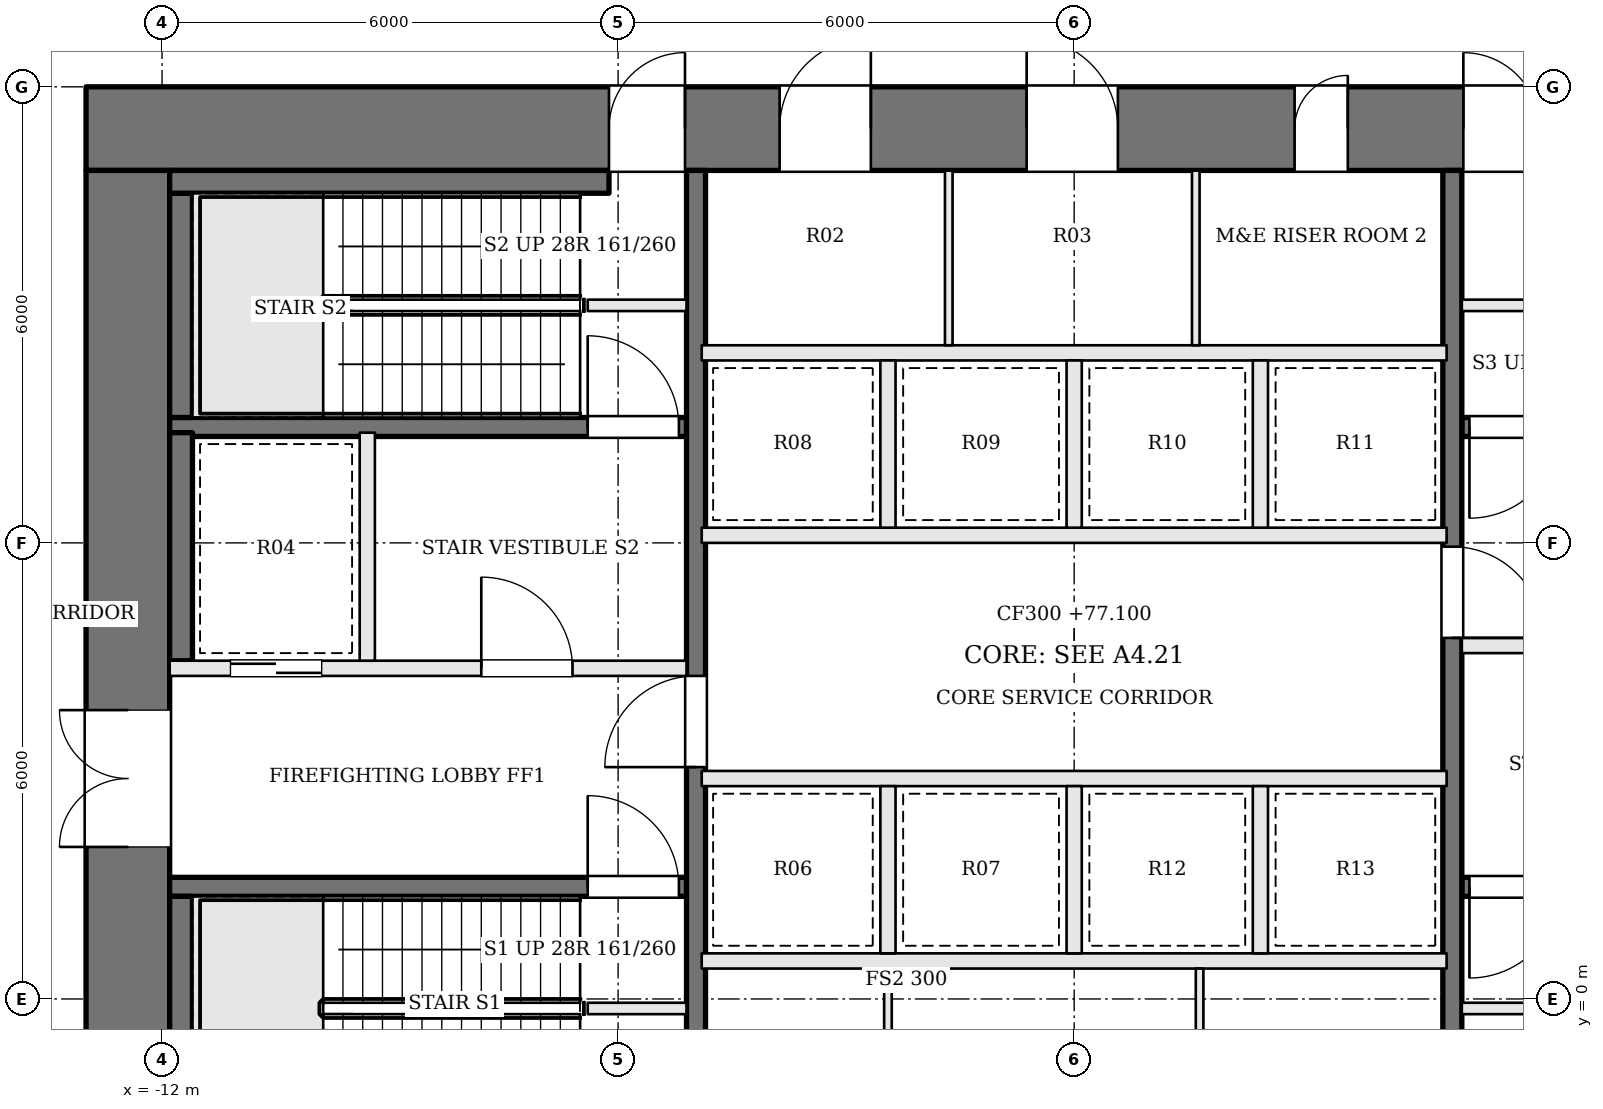
"""IFC4 building model, lengths in metres.
Left out: names, types, materials, properties, quantities, classifications, styles, units other than length and angle.
Written with IfcOpenShell. Run it as: python <this file> out.ifc"""

import sys

from ifc_helpers import new_model, si_unit, direction, frame, frame_2d, origin, place, context, subcontext, project, spatial, rectangle, extrude, element, fill, save


model = new_model("IFC4")
c1 = context("Model", 3, precision=1e-05, world=origin(), true_north=direction((0.0, 1.0)))
c2 = subcontext(c1, "Body", "Model", "MODEL_VIEW")
j1 = project(units=[si_unit("LENGTHUNIT", "METRE"), si_unit("PLANEANGLEUNIT", "RADIAN")], contexts=[c1])
p1 = place(None, origin())
s1 = spatial("IfcSite", under=j1, at=p1, CompositionType="ELEMENT")
p2 = place(p1, origin())
s2 = spatial("IfcBuilding", under=s1, at=p2, CompositionType="ELEMENT")
p3 = place(p2, frame((0.0, 0.0, 77.1)))
s3 = spatial("IfcBuildingStorey", under=s2, at=p3, CompositionType="ELEMENT", Elevation=77.1)
p4 = place(p3, frame((-13.0, 11.45, 0.0), z_axis=(0.0, 0.0, 1.0), x_axis=(1.0, 0.0, 0.0)))
e1 = element("IfcWall", 1, at=p4, inside=s3, PredefinedType="SHEAR", context=c2, shape_type="SweptSolid", body=[
    extrude(rectangle(XDim=26.0, YDim=1.1, at=frame_2d((13.0, 0.0))), origin(), (0.0, 0.0, 1.0), 4.5),
])
p5 = place(p4, frame((9.125, 0.0, 0.0)))
e2 = element("IfcOpeningElement", 2, at=p5, cuts=e1, PredefinedType="OPENING", context=c2, shape_type="SweptSolid", body=[
    extrude(rectangle(XDim=1.2, YDim=2.1, at=frame_2d((0.6, 1.05))), frame((0.0, 0.56, 0.0), z_axis=(0.0, -1.0, 0.0), x_axis=(1.0, 0.0, 0.0)), (0.0, 0.0, 1.0), 1.12),
])
p6 = place(p4, frame((12.375, 0.0, 0.0)))
e3 = element("IfcOpeningElement", 3, at=p6, cuts=e1, PredefinedType="OPENING", context=c2, shape_type="SweptSolid", body=[
    extrude(rectangle(XDim=1.2, YDim=2.1, at=frame_2d((0.6, 1.05))), frame((0.0, 0.56, 0.0), z_axis=(0.0, -1.0, 0.0), x_axis=(1.0, 0.0, 0.0)), (0.0, 0.0, 1.0), 1.12),
])
p7 = place(p4, frame((15.9, 0.0, 0.0)))
e4 = element("IfcOpeningElement", 4, at=p7, cuts=e1, PredefinedType="OPENING", context=c2, shape_type="SweptSolid", body=[
    extrude(rectangle(XDim=0.7, YDim=2.1, at=frame_2d((0.35, 1.05))), frame((0.0, 0.56, 0.0), z_axis=(0.0, -1.0, 0.0), x_axis=(1.0, 0.0, 0.0)), (0.0, 0.0, 1.0), 1.12),
])
p8 = place(p4, frame((6.88, 0.0, 0.0)))
e5 = element("IfcOpeningElement", 5, at=p8, cuts=e1, PredefinedType="OPENING", context=c2, shape_type="SweptSolid", body=[
    extrude(rectangle(XDim=1.0, YDim=2.1, at=frame_2d((0.5, 1.05))), frame((0.0, 0.56, 0.0), z_axis=(0.0, -1.0, 0.0), x_axis=(1.0, 0.0, 0.0)), (0.0, 0.0, 1.0), 1.12),
])
p9 = place(p4, frame((18.12, 0.0, 0.0)))
e6 = element("IfcOpeningElement", 6, at=p9, cuts=e1, PredefinedType="OPENING", context=c2, shape_type="SweptSolid", body=[
    extrude(rectangle(XDim=1.0, YDim=2.1, at=frame_2d((0.5, 1.05))), frame((0.0, 0.56, 0.0), z_axis=(0.0, -1.0, 0.0), x_axis=(1.0, 0.0, 0.0)), (0.0, 0.0, 1.0), 1.12),
])
p10 = place(p3, frame((-12.45, -1.9, 0.0), z_axis=(0.0, 0.0, 1.0), x_axis=(0.0, 1.0, 0.0)))
e7 = element("IfcWall", 7, at=p10, inside=s3, PredefinedType="SHEAR", context=c2, shape_type="SweptSolid", body=[
    extrude(rectangle(XDim=12.8, YDim=1.1, at=frame_2d((6.4, 0.0))), origin(), (0.0, 0.0, 1.0), 4.5),
])
p11 = place(p10, frame((3.9, 0.0, 0.0)))
e8 = element("IfcOpeningElement", 8, at=p11, cuts=e7, PredefinedType="OPENING", context=c2, shape_type="SweptSolid", body=[
    extrude(rectangle(XDim=1.8, YDim=2.1, at=frame_2d((0.9, 1.05))), frame((0.0, 0.56, 0.0), z_axis=(0.0, -1.0, 0.0), x_axis=(1.0, 0.0, 0.0)), (0.0, 0.0, 1.0), 1.12),
])
for number, where, z_axis, x_axis in (
    (9, (-6.4, -0.125, 0.0), (0.0, 0.0, 1.0), (1.0, 0.0, 0.0)),
    (10, (6.4, 9.125, 0.0), (0.0, 0.0, 1.0), (-1.0, 0.0, 0.0)),
    (11, (-6.4, 9.125, 0.0), (0.0, 0.0, 1.0), (1.0, 0.0, 0.0)),
    (12, (6.4, -0.125, 0.0), (0.0, 0.0, 1.0), (-1.0, 0.0, 0.0)),
):
    element("IfcWall", number, at=place(p3, frame(where, z_axis=z_axis, x_axis=x_axis)), inside=s3, PredefinedType="SOLIDWALL", context=c2, shape_type="SweptSolid", body=[
        extrude(rectangle(XDim=1.3, YDim=0.15, at=frame_2d((0.65, 0.0))), origin(), (0.0, 0.0, 1.0), 4.3),
    ])
p12 = place(p3, frame((-11.9, 1.475, 0.0), z_axis=(0.0, 0.0, 1.0), x_axis=(1.0, 0.0, 0.0)))
e13 = element("IfcWall", 13, at=p12, inside=s3, PredefinedType="SOLIDWALL", context=c2, shape_type="SweptSolid", body=[
    extrude(rectangle(XDim=6.8, YDim=0.25, at=frame_2d((3.4, 0.0))), origin(), (0.0, 0.0, 1.0), 4.3),
])
p13 = place(p12, frame((5.5, 0.0, 0.0)))
e14 = element("IfcOpeningElement", 14, at=p13, cuts=e13, PredefinedType="OPENING", context=c2, shape_type="SweptSolid", body=[
    extrude(rectangle(XDim=1.2, YDim=2.1, at=frame_2d((0.6, 1.05))), frame((0.0, 0.135, 0.0), z_axis=(0.0, -1.0, 0.0), x_axis=(1.0, 0.0, 0.0)), (0.0, 0.0, 1.0), 0.27),
])
p14 = place(p3, frame((11.9, 7.525, 0.0), z_axis=(0.0, 0.0, 1.0), x_axis=(-1.0, 0.0, 0.0)))
e15 = element("IfcWall", 15, at=p14, inside=s3, PredefinedType="SOLIDWALL", context=c2, shape_type="SweptSolid", body=[
    extrude(rectangle(XDim=6.8, YDim=0.25, at=frame_2d((3.4, 0.0))), origin(), (0.0, 0.0, 1.0), 4.3),
])
p15 = place(p14, frame((5.5, 0.0, 0.0)))
e16 = element("IfcOpeningElement", 16, at=p15, cuts=e15, PredefinedType="OPENING", context=c2, shape_type="SweptSolid", body=[
    extrude(rectangle(XDim=1.2, YDim=2.1, at=frame_2d((0.6, 1.05))), frame((0.0, 0.135, 0.0), z_axis=(0.0, -1.0, 0.0), x_axis=(1.0, 0.0, 0.0)), (0.0, 0.0, 1.0), 0.27),
])
p16 = place(p3, frame((-11.9, 4.35, 0.0), z_axis=(0.0, 0.0, 1.0), x_axis=(1.0, 0.0, 0.0)))
e17 = element("IfcWall", 17, at=p16, inside=s3, PredefinedType="SOLIDWALL", context=c2, shape_type="SweptSolid", body=[
    extrude(rectangle(XDim=6.8, YDim=0.2, at=frame_2d((3.4, 0.0))), origin(), (0.0, 0.0, 1.0), 4.3),
])
p17 = place(p16, frame((4.1, 0.0, 0.0)))
e18 = element("IfcOpeningElement", 18, at=p17, cuts=e17, PredefinedType="OPENING", context=c2, shape_type="SweptSolid", body=[
    extrude(rectangle(XDim=1.2, YDim=2.1, at=frame_2d((0.6, 1.05))), frame((0.0, 0.11, 0.0), z_axis=(0.0, -1.0, 0.0), x_axis=(1.0, 0.0, 0.0)), (0.0, 0.0, 1.0), 0.22),
])
p18 = place(p16, frame((0.8, 0.0, 0.0)))
e19 = element("IfcOpeningElement", 19, at=p18, cuts=e17, PredefinedType="OPENING", context=c2, shape_type="SweptSolid", body=[
    extrude(rectangle(XDim=1.2, YDim=2.1, at=frame_2d((0.6, 1.05))), frame((0.0, 0.11, 0.0), z_axis=(0.0, -1.0, 0.0), x_axis=(1.0, 0.0, 0.0)), (0.0, 0.0, 1.0), 0.22),
])
p19 = place(p3, frame((11.9, 4.65, 0.0), z_axis=(0.0, 0.0, 1.0), x_axis=(-1.0, 0.0, 0.0)))
e20 = element("IfcWall", 20, at=p19, inside=s3, PredefinedType="SOLIDWALL", context=c2, shape_type="SweptSolid", body=[
    extrude(rectangle(XDim=6.8, YDim=0.2, at=frame_2d((3.4, 0.0))), origin(), (0.0, 0.0, 1.0), 4.3),
])
p20 = place(p19, frame((4.1, 0.0, 0.0)))
e21 = element("IfcOpeningElement", 21, at=p20, cuts=e20, PredefinedType="OPENING", context=c2, shape_type="SweptSolid", body=[
    extrude(rectangle(XDim=1.2, YDim=2.1, at=frame_2d((0.6, 1.05))), frame((0.0, 0.11, 0.0), z_axis=(0.0, -1.0, 0.0), x_axis=(1.0, 0.0, 0.0)), (0.0, 0.0, 1.0), 0.22),
])
p21 = place(p19, frame((0.8, 0.0, 0.0)))
e22 = element("IfcOpeningElement", 22, at=p21, cuts=e20, PredefinedType="OPENING", context=c2, shape_type="SweptSolid", body=[
    extrude(rectangle(XDim=1.2, YDim=2.1, at=frame_2d((0.6, 1.05))), frame((0.0, 0.11, 0.0), z_axis=(0.0, -1.0, 0.0), x_axis=(1.0, 0.0, 0.0)), (0.0, 0.0, 1.0), 0.22),
])
p22 = place(p3, frame((-11.9, 7.525, 0.0), z_axis=(0.0, 0.0, 1.0), x_axis=(1.0, 0.0, 0.0)))
e23 = element("IfcWall", 23, at=p22, inside=s3, PredefinedType="SOLIDWALL", context=c2, shape_type="SweptSolid", body=[
    extrude(rectangle(XDim=6.8, YDim=0.25, at=frame_2d((3.4, 0.0))), origin(), (0.0, 0.0, 1.0), 4.3),
])
p23 = place(p22, frame((5.5, 0.0, 0.0)))
e24 = element("IfcOpeningElement", 24, at=p23, cuts=e23, PredefinedType="OPENING", context=c2, shape_type="SweptSolid", body=[
    extrude(rectangle(XDim=1.2, YDim=2.1, at=frame_2d((0.6, 1.05))), frame((0.0, 0.135, 0.0), z_axis=(0.0, -1.0, 0.0), x_axis=(1.0, 0.0, 0.0)), (0.0, 0.0, 1.0), 0.27),
])
p24 = place(p3, frame((11.9, 1.475, 0.0), z_axis=(0.0, 0.0, 1.0), x_axis=(-1.0, 0.0, 0.0)))
e25 = element("IfcWall", 25, at=p24, inside=s3, PredefinedType="SOLIDWALL", context=c2, shape_type="SweptSolid", body=[
    extrude(rectangle(XDim=6.8, YDim=0.25, at=frame_2d((3.4, 0.0))), origin(), (0.0, 0.0, 1.0), 4.3),
])
p25 = place(p24, frame((5.5, 0.0, 0.0)))
e26 = element("IfcOpeningElement", 26, at=p25, cuts=e25, PredefinedType="OPENING", context=c2, shape_type="SweptSolid", body=[
    extrude(rectangle(XDim=1.2, YDim=2.1, at=frame_2d((0.6, 1.05))), frame((0.0, 0.135, 0.0), z_axis=(0.0, -1.0, 0.0), x_axis=(1.0, 0.0, 0.0)), (0.0, 0.0, 1.0), 0.27),
])
p26 = place(p3, frame((-9.3, 4.45, 0.0), z_axis=(0.0, 0.0, 1.0), x_axis=(0.0, 1.0, 0.0)))
e27 = element("IfcWall", 27, at=p26, inside=s3, PredefinedType="SOLIDWALL", context=c2, shape_type="SweptSolid", body=[
    extrude(rectangle(XDim=3.0, YDim=0.2, at=frame_2d((1.5, 0.0))), origin(), (0.0, 0.0, 1.0), 4.3),
])
p27 = place(p3, frame((-4.975, -1.9, 0.0), z_axis=(0.0, 0.0, 1.0), x_axis=(0.0, 1.0, 0.0)))
e28 = element("IfcWall", 28, at=p27, inside=s3, PredefinedType="SOLIDWALL", context=c2, shape_type="SweptSolid", body=[
    extrude(rectangle(XDim=12.8, YDim=0.25, at=frame_2d((6.4, 0.0))), origin(), (0.0, 0.0, 1.0), 4.3),
])
p28 = place(p27, frame((4.95, 0.0, 0.0)))
e29 = element("IfcOpeningElement", 29, at=p28, cuts=e28, PredefinedType="OPENING", context=c2, shape_type="SweptSolid", body=[
    extrude(rectangle(XDim=1.2, YDim=2.1, at=frame_2d((0.6, 1.05))), frame((0.0, 0.135, 0.0), z_axis=(0.0, -1.0, 0.0), x_axis=(1.0, 0.0, 0.0)), (0.0, 0.0, 1.0), 0.27),
])
p29 = place(p3, frame((4.975, 10.9, 0.0), z_axis=(0.0, 0.0, 1.0), x_axis=(0.0, -1.0, 0.0)))
e30 = element("IfcWall", 30, at=p29, inside=s3, PredefinedType="SOLIDWALL", context=c2, shape_type="SweptSolid", body=[
    extrude(rectangle(XDim=12.8, YDim=0.25, at=frame_2d((6.4, 0.0))), origin(), (0.0, 0.0, 1.0), 4.3),
])
p30 = place(p29, frame((4.95, 0.0, 0.0)))
e31 = element("IfcOpeningElement", 31, at=p30, cuts=e30, PredefinedType="OPENING", context=c2, shape_type="SweptSolid", body=[
    extrude(rectangle(XDim=1.2, YDim=2.1, at=frame_2d((0.6, 1.05))), frame((0.0, 0.135, 0.0), z_axis=(0.0, -1.0, 0.0), x_axis=(1.0, 0.0, 0.0)), (0.0, 0.0, 1.0), 0.27),
])
p31 = place(p3, frame((-11.75, -1.6, 0.0), z_axis=(0.0, 0.0, 1.0), x_axis=(0.0, 1.0, 0.0)))
e32 = element("IfcWall", 32, at=p31, inside=s3, PredefinedType="SOLIDWALL", context=c2, shape_type="SweptSolid", body=[
    extrude(rectangle(XDim=2.95, YDim=0.3, at=frame_2d((1.475, 0.0))), origin(), (0.0, 0.0, 1.0), 4.3),
])
p32 = place(p3, frame((-11.75, 4.45, 0.0), z_axis=(0.0, 0.0, 1.0), x_axis=(0.0, 1.0, 0.0)))
e33 = element("IfcWall", 33, at=p32, inside=s3, PredefinedType="SOLIDWALL", context=c2, shape_type="SweptSolid", body=[
    extrude(rectangle(XDim=3.0, YDim=0.3, at=frame_2d((1.5, 0.0))), origin(), (0.0, 0.0, 1.0), 4.3),
])
p33 = place(p3, frame((-11.75, 7.65, 0.0), z_axis=(0.0, 0.0, 1.0), x_axis=(0.0, 1.0, 0.0)))
e34 = element("IfcWall", 34, at=p33, inside=s3, PredefinedType="SOLIDWALL", context=c2, shape_type="SweptSolid", body=[
    extrude(rectangle(XDim=2.95, YDim=0.3, at=frame_2d((1.475, 0.0))), origin(), (0.0, 0.0, 1.0), 4.3),
])
p34 = place(p3, frame((-11.9, 10.75, 0.0), z_axis=(0.0, 0.0, 1.0), x_axis=(1.0, 0.0, 0.0)))
e35 = element("IfcWall", 35, at=p34, inside=s3, PredefinedType="SOLIDWALL", context=c2, shape_type="SweptSolid", body=[
    extrude(rectangle(XDim=5.78, YDim=0.3, at=frame_2d((2.89, 0.0))), origin(), (0.0, 0.0, 1.0), 4.3),
])
for number, where, z_axis, x_axis in (
    (36, (-4.9, 0.5, 0.0), (0.0, 0.0, 1.0), (1.0, 0.0, 0.0)),
    (37, (-4.9, 2.9, 0.0), (0.0, 0.0, 1.0), (1.0, 0.0, 0.0)),
    (38, (-4.9, 6.1, 0.0), (0.0, 0.0, 1.0), (1.0, 0.0, 0.0)),
    (39, (-4.9, 8.5, 0.0), (0.0, 0.0, 1.0), (1.0, 0.0, 0.0)),
):
    element("IfcWall", number, at=place(p3, frame(where, z_axis=z_axis, x_axis=x_axis)), inside=s3, PredefinedType="SOLIDWALL", context=c2, shape_type="SweptSolid", body=[
        extrude(rectangle(XDim=9.8, YDim=0.2, at=frame_2d((4.9, 0.0))), origin(), (0.0, 0.0, 1.0), 4.3),
    ])
for number, where, z_axis, x_axis in (
    (40, (-2.45, 0.6, 0.0), (0.0, 0.0, 1.0), (0.0, 1.0, 0.0)),
    (41, (0.0, 0.6, 0.0), (0.0, 0.0, 1.0), (0.0, 1.0, 0.0)),
    (42, (2.45, 0.6, 0.0), (0.0, 0.0, 1.0), (0.0, 1.0, 0.0)),
    (43, (-2.45, 6.2, 0.0), (0.0, 0.0, 1.0), (0.0, 1.0, 0.0)),
    (44, (0.0, 6.2, 0.0), (0.0, 0.0, 1.0), (0.0, 1.0, 0.0)),
    (45, (2.45, 6.2, 0.0), (0.0, 0.0, 1.0), (0.0, 1.0, 0.0)),
):
    element("IfcWall", number, at=place(p3, frame(where, z_axis=z_axis, x_axis=x_axis)), inside=s3, PredefinedType="SOLIDWALL", context=c2, shape_type="SweptSolid", body=[
        extrude(rectangle(XDim=2.2, YDim=0.2, at=frame_2d((1.1, 0.0))), origin(), (0.0, 0.0, 1.0), 4.3),
    ])
for number, where, z_axis, x_axis in (
    (46, (-2.45, -1.9, 0.0), (0.0, 0.0, 1.0), (0.0, 1.0, 0.0)),
    (47, (1.65, -1.9, 0.0), (0.0, 0.0, 1.0), (0.0, 1.0, 0.0)),
    (48, (-1.65, 8.6, 0.0), (0.0, 0.0, 1.0), (0.0, 1.0, 0.0)),
    (49, (1.6, 8.6, 0.0), (0.0, 0.0, 1.0), (0.0, 1.0, 0.0)),
):
    element("IfcWall", number, at=place(p3, frame(where, z_axis=z_axis, x_axis=x_axis)), inside=s3, PredefinedType="PARTITIONING", context=c2, shape_type="SweptSolid", body=[
        extrude(rectangle(XDim=2.3, YDim=0.1, at=frame_2d((1.15, 0.0))), origin(), (0.0, 0.0, 1.0), 4.3),
    ])
p35 = place(p11, origin())
e50 = element("IfcDoor", 50, at=p35, inside=s3, OperationType="DOUBLE_DOOR_SINGLE_SWING", PredefinedType="DOOR", context=c2, shape_type="SweptSolid", body=[
    extrude(rectangle(XDim=1.8, YDim=2.1, at=frame_2d((0.9, 1.05))), frame((0.0, 0.025, 0.0), z_axis=(0.0, -1.0, 0.0), x_axis=(1.0, 0.0, 0.0)), (0.0, 0.0, 1.0), 0.05),
])
fill(e8, e50)
p36 = place(p28, origin())
e51 = element("IfcDoor", 51, at=p36, inside=s3, OperationType="SINGLE_SWING_LEFT", PredefinedType="DOOR", context=c2, shape_type="SweptSolid", body=[
    extrude(rectangle(XDim=1.2, YDim=2.1, at=frame_2d((0.6, 1.05))), frame((0.0, 0.025, 0.0), z_axis=(0.0, -1.0, 0.0), x_axis=(1.0, 0.0, 0.0)), (0.0, 0.0, 1.0), 0.05),
])
fill(e29, e51)
p37 = place(p30, origin())
e52 = element("IfcDoor", 52, at=p37, inside=s3, OperationType="SINGLE_SWING_RIGHT", PredefinedType="DOOR", context=c2, shape_type="SweptSolid", body=[
    extrude(rectangle(XDim=1.2, YDim=2.1, at=frame_2d((0.6, 1.05))), frame((0.0, 0.025, 0.0), z_axis=(0.0, -1.0, 0.0), x_axis=(1.0, 0.0, 0.0)), (0.0, 0.0, 1.0), 0.05),
])
fill(e31, e52)
p38 = place(p17, origin())
e53 = element("IfcDoor", 53, at=p38, inside=s3, OperationType="SINGLE_SWING_LEFT", PredefinedType="DOOR", context=c2, shape_type="SweptSolid", body=[
    extrude(rectangle(XDim=1.2, YDim=2.1, at=frame_2d((0.6, 1.05))), frame((0.0, 0.025, 0.0), z_axis=(0.0, -1.0, 0.0), x_axis=(1.0, 0.0, 0.0)), (0.0, 0.0, 1.0), 0.05),
])
fill(e18, e53)
p39 = place(p13, origin())
e54 = element("IfcDoor", 54, at=p39, inside=s3, OperationType="SINGLE_SWING_LEFT", PredefinedType="DOOR", context=c2, shape_type="SweptSolid", body=[
    extrude(rectangle(XDim=1.2, YDim=2.1, at=frame_2d((0.6, 1.05))), frame((0.0, 0.025, 0.0), z_axis=(0.0, -1.0, 0.0), x_axis=(1.0, 0.0, 0.0)), (0.0, 0.0, 1.0), 0.05),
])
fill(e14, e54)
p40 = place(p15, origin())
e55 = element("IfcDoor", 55, at=p40, inside=s3, OperationType="SINGLE_SWING_RIGHT", PredefinedType="DOOR", context=c2, shape_type="SweptSolid", body=[
    extrude(rectangle(XDim=1.2, YDim=2.1, at=frame_2d((0.6, 1.05))), frame((0.0, 0.025, 0.0), z_axis=(0.0, -1.0, 0.0), x_axis=(1.0, 0.0, 0.0)), (0.0, 0.0, 1.0), 0.05),
])
fill(e16, e55)
p41 = place(p23, origin())
e56 = element("IfcDoor", 56, at=p41, inside=s3, OperationType="SINGLE_SWING_LEFT", PredefinedType="DOOR", context=c2, shape_type="SweptSolid", body=[
    extrude(rectangle(XDim=1.2, YDim=2.1, at=frame_2d((0.6, 1.05))), frame((0.0, 0.025, 0.0), z_axis=(0.0, -1.0, 0.0), x_axis=(1.0, 0.0, 0.0)), (0.0, 0.0, 1.0), 0.05),
])
fill(e24, e56)
p42 = place(p25, origin())
e57 = element("IfcDoor", 57, at=p42, inside=s3, OperationType="SINGLE_SWING_RIGHT", PredefinedType="DOOR", context=c2, shape_type="SweptSolid", body=[
    extrude(rectangle(XDim=1.2, YDim=2.1, at=frame_2d((0.6, 1.05))), frame((0.0, 0.025, 0.0), z_axis=(0.0, -1.0, 0.0), x_axis=(1.0, 0.0, 0.0)), (0.0, 0.0, 1.0), 0.05),
])
fill(e26, e57)
p43 = place(p18, origin())
e58 = element("IfcDoor", 58, at=p43, inside=s3, OperationType="SLIDING_TO_RIGHT", PredefinedType="DOOR", context=c2, shape_type="SweptSolid", body=[
    extrude(rectangle(XDim=1.2, YDim=2.1, at=frame_2d((0.6, 1.05))), frame((0.0, 0.025, 0.0), z_axis=(0.0, -1.0, 0.0), x_axis=(1.0, 0.0, 0.0)), (0.0, 0.0, 1.0), 0.05),
])
fill(e19, e58)
p44 = place(p5, origin())
e59 = element("IfcDoor", 59, at=p44, inside=s3, OperationType="SINGLE_SWING_RIGHT", PredefinedType="DOOR", context=c2, shape_type="SweptSolid", body=[
    extrude(rectangle(XDim=1.2, YDim=2.1, at=frame_2d((0.6, 1.05))), frame((0.0, 0.025, 0.0), z_axis=(0.0, -1.0, 0.0), x_axis=(1.0, 0.0, 0.0)), (0.0, 0.0, 1.0), 0.05),
])
fill(e2, e59)
p45 = place(p6, origin())
e60 = element("IfcDoor", 60, at=p45, inside=s3, OperationType="SINGLE_SWING_LEFT", PredefinedType="DOOR", context=c2, shape_type="SweptSolid", body=[
    extrude(rectangle(XDim=1.2, YDim=2.1, at=frame_2d((0.6, 1.05))), frame((0.0, 0.025, 0.0), z_axis=(0.0, -1.0, 0.0), x_axis=(1.0, 0.0, 0.0)), (0.0, 0.0, 1.0), 0.05),
])
fill(e3, e60)
p46 = place(p7, origin())
e61 = element("IfcDoor", 61, at=p46, inside=s3, OperationType="SINGLE_SWING_RIGHT", PredefinedType="DOOR", context=c2, shape_type="SweptSolid", body=[
    extrude(rectangle(XDim=0.7, YDim=2.1, at=frame_2d((0.35, 1.05))), frame((0.0, 0.025, 0.0), z_axis=(0.0, -1.0, 0.0), x_axis=(1.0, 0.0, 0.0)), (0.0, 0.0, 1.0), 0.05),
])
fill(e4, e61)
p47 = place(p8, origin())
e62 = element("IfcDoor", 62, at=p47, inside=s3, OperationType="SINGLE_SWING_RIGHT", PredefinedType="DOOR", context=c2, shape_type="SweptSolid", body=[
    extrude(rectangle(XDim=1.0, YDim=2.1, at=frame_2d((0.5, 1.05))), frame((0.0, 0.025, 0.0), z_axis=(0.0, -1.0, 0.0), x_axis=(1.0, 0.0, 0.0)), (0.0, 0.0, 1.0), 0.05),
])
fill(e5, e62)
p48 = place(p9, origin())
e63 = element("IfcDoor", 63, at=p48, inside=s3, OperationType="SINGLE_SWING_LEFT", PredefinedType="DOOR", context=c2, shape_type="SweptSolid", body=[
    extrude(rectangle(XDim=1.0, YDim=2.1, at=frame_2d((0.5, 1.05))), frame((0.0, 0.025, 0.0), z_axis=(0.0, -1.0, 0.0), x_axis=(1.0, 0.0, 0.0)), (0.0, 0.0, 1.0), 0.05),
])
fill(e6, e63)
save(model, sys.argv[1])
